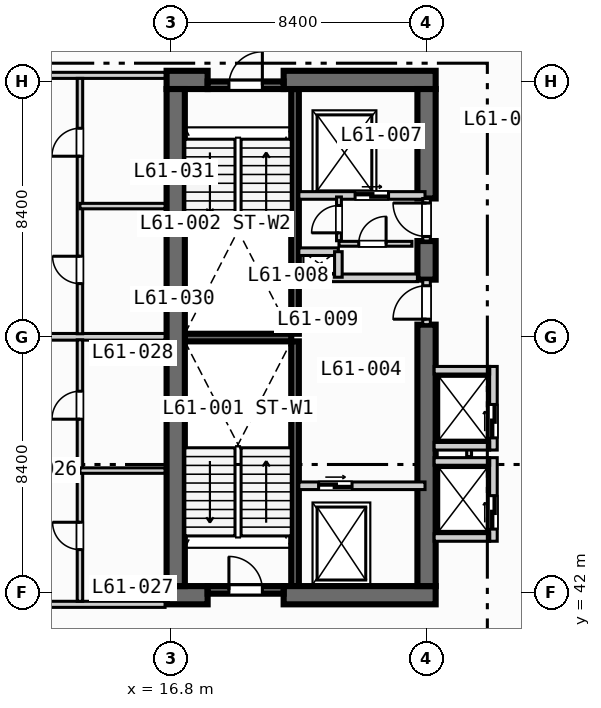
"""IFC4 building model, lengths in metres.
Left out: names, types, materials, properties, quantities, classifications, styles, units other than length and angle.
Written with IfcOpenShell. Run it as: python <this file> out.ifc"""

import sys

from ifc_helpers import new_model, si_unit, direction, frame, frame_2d, origin, place, context, subcontext, project, spatial, rectangle, extrude, element, fill, save


model = new_model("IFC4")
c1 = context("Model", 3, precision=1e-05, world=origin(), true_north=direction((0.0, 1.0)))
c2 = subcontext(c1, "Body", "Model", "MODEL_VIEW")
j1 = project(units=[si_unit("LENGTHUNIT", "METRE"), si_unit("PLANEANGLEUNIT", "RADIAN")], contexts=[c1])
p1 = place(None, origin())
s1 = spatial("IfcSite", under=j1, at=p1, CompositionType="ELEMENT")
p2 = place(p1, origin())
s2 = spatial("IfcBuilding", under=s1, at=p2, CompositionType="ELEMENT")
p3 = place(p2, frame((0.0, 0.0, 249.0)))
s3 = spatial("IfcBuildingStorey", under=s2, at=p3, CompositionType="ELEMENT", Elevation=249.0)
for number, where, z_axis, x_axis in (
    (1, (20.875, 42.2, 0.0), (0.0, 0.0, 1.0), (0.0, 1.0, 0.0)),
    (2, (20.875, 50.5, 0.0), (0.0, 0.0, 1.0), (0.0, 1.0, 0.0)),
):
    element("IfcWall", number, at=place(p3, frame(where, z_axis=z_axis, x_axis=x_axis)), inside=s3, PredefinedType="SOLIDWALL", context=c2, shape_type="SweptSolid", body=[
        extrude(rectangle(XDim=8.05, YDim=0.25, at=frame_2d((4.025, 0.0))), origin(), (0.0, 0.0, 1.0), 3.47),
    ])
p4 = place(p3, frame((17.25, 50.375, 0.0), z_axis=(0.0, 0.0, 1.0), x_axis=(1.0, 0.0, 0.0)))
e3 = element("IfcWall", 3, at=p4, inside=s3, PredefinedType="SOLIDWALL", context=c2, shape_type="SweptSolid", body=[
    extrude(rectangle(XDim=3.5, YDim=0.25, at=frame_2d((1.75, 0.0))), origin(), (0.0, 0.0, 1.0), 3.47),
])
p5 = place(p3, frame((16.65, 41.9, 0.0), z_axis=(0.0, 0.0, 1.0), x_axis=(1.0, 0.0, 0.0)))
e4 = element("IfcWall", 4, at=p5, inside=s3, PredefinedType="SHEAR", context=c2, shape_type="SweptSolid", body=[
    extrude(rectangle(XDim=1.35, YDim=0.6, at=frame_2d((0.675, 0.0))), origin(), (0.0, 0.0, 1.0), 3.47),
])
p6 = place(p3, frame((20.5, 41.9, 0.0), z_axis=(0.0, 0.0, 1.0), x_axis=(1.0, 0.0, 0.0)))
e5 = element("IfcWall", 5, at=p6, inside=s3, PredefinedType="SHEAR", context=c2, shape_type="SweptSolid", body=[
    extrude(rectangle(XDim=5.0, YDim=0.6, at=frame_2d((2.5, 0.0))), origin(), (0.0, 0.0, 1.0), 3.47),
])
p7 = place(p3, frame((16.65, 58.85, 0.0), z_axis=(0.0, 0.0, 1.0), x_axis=(1.0, 0.0, 0.0)))
e6 = element("IfcWall", 6, at=p7, inside=s3, PredefinedType="SHEAR", context=c2, shape_type="SweptSolid", body=[
    extrude(rectangle(XDim=1.35, YDim=0.6, at=frame_2d((0.675, 0.0))), origin(), (0.0, 0.0, 1.0), 3.47),
])
p8 = place(p3, frame((20.5, 58.85, 0.0), z_axis=(0.0, 0.0, 1.0), x_axis=(1.0, 0.0, 0.0)))
e7 = element("IfcWall", 7, at=p8, inside=s3, PredefinedType="SHEAR", context=c2, shape_type="SweptSolid", body=[
    extrude(rectangle(XDim=5.0, YDim=0.6, at=frame_2d((2.5, 0.0))), origin(), (0.0, 0.0, 1.0), 3.47),
])
p9 = place(p3, frame((16.95, 42.2, 0.0), z_axis=(0.0, 0.0, 1.0), x_axis=(0.0, 1.0, 0.0)))
e8 = element("IfcWall", 8, at=p9, inside=s3, PredefinedType="SHEAR", context=c2, shape_type="SweptSolid", body=[
    extrude(rectangle(XDim=16.35, YDim=0.6, at=frame_2d((8.175, 0.0))), origin(), (0.0, 0.0, 1.0), 3.47),
])
p10 = place(p3, frame((25.2, 42.2, 0.0), z_axis=(0.0, 0.0, 1.0), x_axis=(0.0, 1.0, 0.0)))
e9 = element("IfcWall", 9, at=p10, inside=s3, PredefinedType="SHEAR", context=c2, shape_type="SweptSolid", body=[
    extrude(rectangle(XDim=8.6, YDim=0.6, at=frame_2d((4.3, 0.0))), origin(), (0.0, 0.0, 1.0), 3.47),
])
p11 = place(p3, frame((25.2, 52.28, 0.0), z_axis=(0.0, 0.0, 1.0), x_axis=(0.0, 1.0, 0.0)))
e10 = element("IfcWall", 10, at=p11, inside=s3, PredefinedType="SHEAR", context=c2, shape_type="SweptSolid", body=[
    extrude(rectangle(XDim=1.27, YDim=0.6, at=frame_2d((0.635, 0.0))), origin(), (0.0, 0.0, 1.0), 3.47),
])
p12 = place(p3, frame((25.2, 54.95, 0.0), z_axis=(0.0, 0.0, 1.0), x_axis=(0.0, 1.0, 0.0)))
e11 = element("IfcWall", 11, at=p12, inside=s3, PredefinedType="SHEAR", context=c2, shape_type="SweptSolid", body=[
    extrude(rectangle(XDim=3.6, YDim=0.6, at=frame_2d((1.8, 0.0))), origin(), (0.0, 0.0, 1.0), 3.47),
])
p13 = place(p3, frame((18.0, 42.075, 0.0), z_axis=(0.0, 0.0, 1.0), x_axis=(1.0, 0.0, 0.0)))
e12 = element("IfcWall", 12, at=p13, inside=s3, PredefinedType="SOLIDWALL", context=c2, shape_type="SweptSolid", body=[
    extrude(rectangle(XDim=2.5, YDim=0.25, at=frame_2d((1.25, 0.0))), origin(), (0.0, 0.0, 1.0), 3.47),
])
p14 = place(p13, frame((0.7, 0.0, 0.0)))
e13 = element("IfcOpeningElement", 13, at=p14, cuts=e12, PredefinedType="OPENING", context=c2, shape_type="SweptSolid", body=[
    extrude(rectangle(XDim=1.1, YDim=2.15, at=frame_2d((0.55, 1.075))), frame((0.0, 0.135, 0.0), z_axis=(0.0, -1.0, 0.0), x_axis=(1.0, 0.0, 0.0)), (0.0, 0.0, 1.0), 0.27),
])
p15 = place(p3, frame((18.0, 58.675, 0.0), z_axis=(0.0, 0.0, 1.0), x_axis=(1.0, 0.0, 0.0)))
e14 = element("IfcWall", 14, at=p15, inside=s3, PredefinedType="SOLIDWALL", context=c2, shape_type="SweptSolid", body=[
    extrude(rectangle(XDim=2.5, YDim=0.25, at=frame_2d((1.25, 0.0))), origin(), (0.0, 0.0, 1.0), 3.47),
])
p16 = place(p15, frame((0.7, 0.0, 0.0)))
e15 = element("IfcOpeningElement", 15, at=p16, cuts=e14, PredefinedType="OPENING", context=c2, shape_type="SweptSolid", body=[
    extrude(rectangle(XDim=1.1, YDim=2.15, at=frame_2d((0.55, 1.075))), frame((0.0, 0.135, 0.0), z_axis=(0.0, -1.0, 0.0), x_axis=(1.0, 0.0, 0.0)), (0.0, 0.0, 1.0), 0.27),
])
p17 = place(p3, frame((21.0, 45.5, 0.0), z_axis=(0.0, 0.0, 1.0), x_axis=(1.0, 0.0, 0.0)))
e16 = element("IfcWall", 16, at=p17, inside=s3, PredefinedType="SOLIDWALL", context=c2, shape_type="SweptSolid", body=[
    extrude(rectangle(XDim=4.15, YDim=0.25, at=frame_2d((2.075, 0.0))), origin(), (0.0, 0.0, 1.0), 3.47),
])
p18 = place(p17, frame((0.65, 0.0, 0.0)))
e17 = element("IfcOpeningElement", 17, at=p18, cuts=e16, PredefinedType="OPENING", context=c2, shape_type="SweptSolid", body=[
    extrude(rectangle(XDim=1.1, YDim=2.15, at=frame_2d((0.55, 1.075))), frame((0.0, 0.135, 0.0), z_axis=(0.0, -1.0, 0.0), x_axis=(1.0, 0.0, 0.0)), (0.0, 0.0, 1.0), 0.27),
])
p19 = place(p3, frame((25.2, 50.8, 0.0), z_axis=(0.0, 0.0, 1.0), x_axis=(0.0, 1.0, 0.0)))
e18 = element("IfcWall", 18, at=p19, inside=s3, PredefinedType="SOLIDWALL", context=c2, shape_type="SweptSolid", body=[
    extrude(rectangle(XDim=1.48, YDim=0.25, at=frame_2d((0.74, 0.0))), origin(), (0.0, 0.0, 1.0), 3.47),
])
p20 = place(p19, frame((0.18, 0.0, 0.0)))
e19 = element("IfcOpeningElement", 19, at=p20, cuts=e18, PredefinedType="OPENING", context=c2, shape_type="SweptSolid", body=[
    extrude(rectangle(XDim=1.1, YDim=2.15, at=frame_2d((0.55, 1.075))), frame((0.0, 0.135, 0.0), z_axis=(0.0, -1.0, 0.0), x_axis=(1.0, 0.0, 0.0)), (0.0, 0.0, 1.0), 0.27),
])
p21 = place(p3, frame((21.0, 52.34, 0.0), z_axis=(0.0, 0.0, 1.0), x_axis=(1.0, 0.0, 0.0)))
e20 = element("IfcWall", 20, at=p21, inside=s3, PredefinedType="SOLIDWALL", context=c2, shape_type="SweptSolid", body=[
    extrude(rectangle(XDim=3.9, YDim=0.25, at=frame_2d((1.95, 0.0))), origin(), (0.0, 0.0, 1.0), 3.47),
])
p22 = place(p3, frame((21.0, 55.05, 0.0), z_axis=(0.0, 0.0, 1.0), x_axis=(1.0, 0.0, 0.0)))
e21 = element("IfcWall", 21, at=p22, inside=s3, PredefinedType="SOLIDWALL", context=c2, shape_type="SweptSolid", body=[
    extrude(rectangle(XDim=4.15, YDim=0.25, at=frame_2d((2.075, 0.0))), origin(), (0.0, 0.0, 1.0), 3.47),
])
p23 = place(p22, frame((1.85, 0.0, 0.0)))
e22 = element("IfcOpeningElement", 22, at=p23, cuts=e21, PredefinedType="OPENING", context=c2, shape_type="SweptSolid", body=[
    extrude(rectangle(XDim=1.1, YDim=2.15, at=frame_2d((0.55, 1.075))), frame((0.0, 0.135, 0.0), z_axis=(0.0, -1.0, 0.0), x_axis=(1.0, 0.0, 0.0)), (0.0, 0.0, 1.0), 0.27),
])
p24 = place(p3, frame((25.2, 53.55, 0.0), z_axis=(0.0, 0.0, 1.0), x_axis=(0.0, 1.0, 0.0)))
e23 = element("IfcWall", 23, at=p24, inside=s3, PredefinedType="SOLIDWALL", context=c2, shape_type="SweptSolid", body=[
    extrude(rectangle(XDim=1.4, YDim=0.25, at=frame_2d((0.7, 0.0))), origin(), (0.0, 0.0, 1.0), 3.47),
])
p25 = place(p24, frame((0.15, 0.0, 0.0)))
e24 = element("IfcOpeningElement", 24, at=p25, cuts=e23, PredefinedType="OPENING", context=c2, shape_type="SweptSolid", body=[
    extrude(rectangle(XDim=1.1, YDim=2.15, at=frame_2d((0.55, 1.075))), frame((0.0, 0.135, 0.0), z_axis=(0.0, -1.0, 0.0), x_axis=(1.0, 0.0, 0.0)), (0.0, 0.0, 1.0), 0.27),
])
p26 = place(p3, frame((21.0, 53.2, 0.0), z_axis=(0.0, 0.0, 1.0), x_axis=(1.0, 0.0, 0.0)))
e25 = element("IfcWall", 25, at=p26, inside=s3, PredefinedType="SOLIDWALL", context=c2, shape_type="SweptSolid", body=[
    extrude(rectangle(XDim=1.3, YDim=0.25, at=frame_2d((0.65, 0.0))), origin(), (0.0, 0.0, 1.0), 3.47),
])
p27 = place(p3, frame((22.3, 52.36, 0.0), z_axis=(0.0, 0.0, 1.0), x_axis=(0.0, 1.0, 0.0)))
e26 = element("IfcWall", 26, at=p27, inside=s3, PredefinedType="SOLIDWALL", context=c2, shape_type="SweptSolid", body=[
    extrude(rectangle(XDim=0.84, YDim=0.25, at=frame_2d((0.42, 0.0))), origin(), (0.0, 0.0, 1.0), 3.47),
])
p28 = place(p3, frame((22.32, 53.56, 0.0), z_axis=(0.0, 0.0, 1.0), x_axis=(0.0, 1.0, 0.0)))
e27 = element("IfcWall", 27, at=p28, inside=s3, PredefinedType="PARTITIONING", context=c2, shape_type="SweptSolid", body=[
    extrude(rectangle(XDim=1.44, YDim=0.16, at=frame_2d((0.72, 0.0))), origin(), (0.0, 0.0, 1.0), 3.47),
])
p29 = place(p28, frame((0.26, 0.0, 0.0)))
e28 = element("IfcOpeningElement", 28, at=p29, cuts=e27, PredefinedType="OPENING", context=c2, shape_type="SweptSolid", body=[
    extrude(rectangle(XDim=0.9, YDim=2.1, at=frame_2d((0.45, 1.05))), frame((0.0, 0.09, 0.0), z_axis=(0.0, -1.0, 0.0), x_axis=(1.0, 0.0, 0.0)), (0.0, 0.0, 1.0), 0.18),
])
p30 = place(p3, frame((22.32, 53.46, 0.0), z_axis=(0.0, 0.0, 1.0), x_axis=(1.0, 0.0, 0.0)))
e29 = element("IfcWall", 29, at=p30, inside=s3, PredefinedType="PARTITIONING", context=c2, shape_type="SweptSolid", body=[
    extrude(rectangle(XDim=2.4, YDim=0.16, at=frame_2d((1.2, 0.0))), origin(), (0.0, 0.0, 1.0), 3.47),
])
p31 = place(p30, frame((0.65, 0.0, 0.0)))
e30 = element("IfcOpeningElement", 30, at=p31, cuts=e29, PredefinedType="OPENING", context=c2, shape_type="SweptSolid", body=[
    extrude(rectangle(XDim=0.9, YDim=2.1, at=frame_2d((0.45, 1.05))), frame((0.0, 0.09, 0.0), z_axis=(0.0, -1.0, 0.0), x_axis=(1.0, 0.0, 0.0)), (0.0, 0.0, 1.0), 0.18),
])
p32 = place(p3, frame((27.4, 43.675, 0.0), z_axis=(0.0, 0.0, 1.0), x_axis=(0.0, 1.0, 0.0)))
e31 = element("IfcWall", 31, at=p32, inside=s3, PredefinedType="SOLIDWALL", context=c2, shape_type="SweptSolid", body=[
    extrude(rectangle(XDim=2.75, YDim=0.25, at=frame_2d((1.375, 0.0))), origin(), (0.0, 0.0, 1.0), 3.47),
])
p33 = place(p32, frame((0.4, 0.0, 0.0)))
e32 = element("IfcOpeningElement", 32, at=p33, cuts=e31, PredefinedType="OPENING", context=c2, shape_type="SweptSolid", body=[
    extrude(rectangle(XDim=1.1, YDim=2.15, at=frame_2d((0.55, 1.075))), frame((0.0, 0.135, 0.0), z_axis=(0.0, -1.0, 0.0), x_axis=(1.0, 0.0, 0.0)), (0.0, 0.0, 1.0), 0.27),
])
for number, where, z_axis, x_axis in (
    (33, (25.45, 43.8, 0.0), (0.0, 0.0, 1.0), (1.0, 0.0, 0.0)),
    (34, (25.45, 46.3, 0.0), (0.0, 0.0, 1.0), (1.0, 0.0, 0.0)),
):
    element("IfcWall", number, at=place(p3, frame(where, z_axis=z_axis, x_axis=x_axis)), inside=s3, PredefinedType="SOLIDWALL", context=c2, shape_type="SweptSolid", body=[
        extrude(rectangle(XDim=1.825, YDim=0.25, at=frame_2d((0.913, 0.0))), origin(), (0.0, 0.0, 1.0), 3.47),
    ])
p34 = place(p3, frame((26.6, 46.46, 0.0), z_axis=(0.0, 0.0, 1.0), x_axis=(0.0, 1.0, 0.0)))
e35 = element("IfcWall", 35, at=p34, inside=s3, PredefinedType="PARTITIONING", context=c2, shape_type="SweptSolid", body=[
    extrude(rectangle(XDim=0.88, YDim=0.16, at=frame_2d((0.44, 0.0))), origin(), (0.0, 0.0, 1.0), 3.47),
])
p35 = place(p3, frame((27.4, 46.675, 0.0), z_axis=(0.0, 0.0, 1.0), x_axis=(0.0, 1.0, 0.0)))
e36 = element("IfcWall", 36, at=p35, inside=s3, PredefinedType="SOLIDWALL", context=c2, shape_type="SweptSolid", body=[
    extrude(rectangle(XDim=2.75, YDim=0.25, at=frame_2d((1.375, 0.0))), origin(), (0.0, 0.0, 1.0), 3.47),
])
p36 = place(p35, frame((0.4, 0.0, 0.0)))
e37 = element("IfcOpeningElement", 37, at=p36, cuts=e36, PredefinedType="OPENING", context=c2, shape_type="SweptSolid", body=[
    extrude(rectangle(XDim=1.1, YDim=2.15, at=frame_2d((0.55, 1.075))), frame((0.0, 0.135, 0.0), z_axis=(0.0, -1.0, 0.0), x_axis=(1.0, 0.0, 0.0)), (0.0, 0.0, 1.0), 0.27),
])
for number, where, z_axis, x_axis in (
    (38, (25.45, 46.8, 0.0), (0.0, 0.0, 1.0), (1.0, 0.0, 0.0)),
    (39, (25.45, 49.3, 0.0), (0.0, 0.0, 1.0), (1.0, 0.0, 0.0)),
):
    element("IfcWall", number, at=place(p3, frame(where, z_axis=z_axis, x_axis=x_axis)), inside=s3, PredefinedType="SOLIDWALL", context=c2, shape_type="SweptSolid", body=[
        extrude(rectangle(XDim=1.825, YDim=0.25, at=frame_2d((0.913, 0.0))), origin(), (0.0, 0.0, 1.0), 3.47),
    ])
p37 = place(p3, frame((8.65, 41.6, 0.0), z_axis=(0.0, 0.0, 1.0), x_axis=(1.0, 0.0, 0.0)))
e40 = element("IfcWall", 40, at=p37, inside=s3, PredefinedType="PARTITIONING", context=c2, shape_type="SweptSolid", body=[
    extrude(rectangle(XDim=7.95, YDim=0.2, at=frame_2d((3.975, 0.0))), origin(), (0.0, 0.0, 1.0), 3.47),
])
p38 = place(p37, frame((2.0, 0.0, 0.0)))
e41 = element("IfcOpeningElement", 41, at=p38, cuts=e40, PredefinedType="OPENING", context=c2, shape_type="SweptSolid", body=[
    extrude(rectangle(XDim=1.0, YDim=2.15, at=frame_2d((0.5, 1.075))), frame((0.0, 0.11, 0.0), z_axis=(0.0, -1.0, 0.0), x_axis=(1.0, 0.0, 0.0)), (0.0, 0.0, 1.0), 0.22),
])
p39 = place(p3, frame((8.65, 59.0, 0.0), z_axis=(0.0, 0.0, 1.0), x_axis=(1.0, 0.0, 0.0)))
e42 = element("IfcWall", 42, at=p39, inside=s3, PredefinedType="PARTITIONING", context=c2, shape_type="SweptSolid", body=[
    extrude(rectangle(XDim=7.95, YDim=0.2, at=frame_2d((3.975, 0.0))), origin(), (0.0, 0.0, 1.0), 2.853),
])
p40 = place(p39, frame((2.0, 0.0, 0.0)))
e43 = element("IfcOpeningElement", 43, at=p40, cuts=e42, PredefinedType="OPENING", context=c2, shape_type="SweptSolid", body=[
    extrude(rectangle(XDim=1.0, YDim=2.15, at=frame_2d((0.5, 1.075))), frame((0.0, 0.11, 0.0), z_axis=(0.0, -1.0, 0.0), x_axis=(1.0, 0.0, 0.0)), (0.0, 0.0, 1.0), 0.22),
])
p41 = place(p3, frame((8.65, 50.4, 0.0), z_axis=(0.0, 0.0, 1.0), x_axis=(1.0, 0.0, 0.0)))
e44 = element("IfcWall", 44, at=p41, inside=s3, PredefinedType="PARTITIONING", context=c2, shape_type="SweptSolid", body=[
    extrude(rectangle(XDim=7.95, YDim=0.22, at=frame_2d((3.975, 0.0))), origin(), (0.0, 0.0, 1.0), 2.82),
])
p42 = place(p3, frame((13.8, 41.7, 0.0), z_axis=(0.0, 0.0, 1.0), x_axis=(0.0, 1.0, 0.0)))
e45 = element("IfcWall", 45, at=p42, inside=s3, PredefinedType="PLUMBINGWALL", context=c2, shape_type="SweptSolid", body=[
    extrude(rectangle(XDim=8.6, YDim=0.18, at=frame_2d((4.3, 0.0))), origin(), (0.0, 0.0, 1.0), 3.47),
])
p43 = place(p42, frame((1.7, 0.0, 0.0)))
e46 = element("IfcOpeningElement", 46, at=p43, cuts=e45, PredefinedType="OPENING", context=c2, shape_type="SweptSolid", body=[
    extrude(rectangle(XDim=0.9, YDim=2.1, at=frame_2d((0.45, 1.05))), frame((0.0, 0.1, 0.0), z_axis=(0.0, -1.0, 0.0), x_axis=(1.0, 0.0, 0.0)), (0.0, 0.0, 1.0), 0.2),
])
p44 = place(p42, frame((5.99, 0.0, 0.0)))
e47 = element("IfcOpeningElement", 47, at=p44, cuts=e45, PredefinedType="OPENING", context=c2, shape_type="SweptSolid", body=[
    extrude(rectangle(XDim=0.92, YDim=2.1, at=frame_2d((0.46, 1.05))), frame((0.0, 0.1, 0.0), z_axis=(0.0, -1.0, 0.0), x_axis=(1.0, 0.0, 0.0)), (0.0, 0.0, 1.0), 0.2),
])
p45 = place(p3, frame((13.8, 46.0, 0.0), z_axis=(0.0, 0.0, 1.0), x_axis=(1.0, 0.0, 0.0)))
e48 = element("IfcWall", 48, at=p45, inside=s3, PredefinedType="PLUMBINGWALL", context=c2, shape_type="SweptSolid", body=[
    extrude(rectangle(XDim=2.8, YDim=0.18, at=frame_2d((1.4, 0.0))), origin(), (0.0, 0.0, 1.0), 3.47),
])
p46 = place(p3, frame((13.8, 50.5, 0.0), z_axis=(0.0, 0.0, 1.0), x_axis=(0.0, 1.0, 0.0)))
e49 = element("IfcWall", 49, at=p46, inside=s3, PredefinedType="PLUMBINGWALL", context=c2, shape_type="SweptSolid", body=[
    extrude(rectangle(XDim=8.4, YDim=0.18, at=frame_2d((4.2, 0.0))), origin(), (0.0, 0.0, 1.0), 3.47),
])
p47 = place(p46, frame((1.65, 0.0, 0.0)))
e50 = element("IfcOpeningElement", 50, at=p47, cuts=e49, PredefinedType="OPENING", context=c2, shape_type="SweptSolid", body=[
    extrude(rectangle(XDim=0.9, YDim=2.1, at=frame_2d((0.45, 1.05))), frame((0.0, 0.1, 0.0), z_axis=(0.0, -1.0, 0.0), x_axis=(1.0, 0.0, 0.0)), (0.0, 0.0, 1.0), 0.2),
])
p48 = place(p46, frame((5.84, 0.0, 0.0)))
e51 = element("IfcOpeningElement", 51, at=p48, cuts=e49, PredefinedType="OPENING", context=c2, shape_type="SweptSolid", body=[
    extrude(rectangle(XDim=0.92, YDim=2.1, at=frame_2d((0.46, 1.05))), frame((0.0, 0.1, 0.0), z_axis=(0.0, -1.0, 0.0), x_axis=(1.0, 0.0, 0.0)), (0.0, 0.0, 1.0), 0.2),
])
p49 = place(p3, frame((13.8, 54.7, 0.0), z_axis=(0.0, 0.0, 1.0), x_axis=(1.0, 0.0, 0.0)))
e52 = element("IfcWall", 52, at=p49, inside=s3, PredefinedType="PLUMBINGWALL", context=c2, shape_type="SweptSolid", body=[
    extrude(rectangle(XDim=2.8, YDim=0.18, at=frame_2d((1.4, 0.0))), origin(), (0.0, 0.0, 1.0), 3.47),
])
p50 = place(p14, origin())
e53 = element("IfcDoor", 53, at=p50, inside=s3, OperationType="SINGLE_SWING_LEFT", PredefinedType="DOOR", context=c2, shape_type="SweptSolid", body=[
    extrude(rectangle(XDim=1.1, YDim=2.15, at=frame_2d((0.55, 1.075))), frame((0.0, 0.025, 0.0), z_axis=(0.0, -1.0, 0.0), x_axis=(1.0, 0.0, 0.0)), (0.0, 0.0, 1.0), 0.05),
])
fill(e13, e53)
p51 = place(p16, origin())
e54 = element("IfcDoor", 54, at=p51, inside=s3, OperationType="SINGLE_SWING_RIGHT", PredefinedType="DOOR", context=c2, shape_type="SweptSolid", body=[
    extrude(rectangle(XDim=1.1, YDim=2.15, at=frame_2d((0.55, 1.075))), frame((0.0, 0.025, 0.0), z_axis=(0.0, -1.0, 0.0), x_axis=(1.0, 0.0, 0.0)), (0.0, 0.0, 1.0), 0.05),
])
fill(e15, e54)
p52 = place(p18, origin())
e55 = element("IfcDoor", 55, at=p52, inside=s3, OperationType="SLIDING_TO_LEFT", PredefinedType="DOOR", context=c2, shape_type="SweptSolid", body=[
    extrude(rectangle(XDim=1.1, YDim=2.15, at=frame_2d((0.55, 1.075))), frame((0.0, 0.025, 0.0), z_axis=(0.0, -1.0, 0.0), x_axis=(1.0, 0.0, 0.0)), (0.0, 0.0, 1.0), 0.05),
])
fill(e17, e55)
p53 = place(p20, origin())
e56 = element("IfcDoor", 56, at=p53, inside=s3, OperationType="SINGLE_SWING_LEFT", PredefinedType="DOOR", context=c2, shape_type="SweptSolid", body=[
    extrude(rectangle(XDim=1.1, YDim=2.15, at=frame_2d((0.55, 1.075))), frame((0.0, 0.025, 0.0), z_axis=(0.0, -1.0, 0.0), x_axis=(1.0, 0.0, 0.0)), (0.0, 0.0, 1.0), 0.05),
])
fill(e19, e56)
p54 = place(p23, origin())
e57 = element("IfcDoor", 57, at=p54, inside=s3, OperationType="SLIDING_TO_LEFT", PredefinedType="DOOR", context=c2, shape_type="SweptSolid", body=[
    extrude(rectangle(XDim=1.1, YDim=2.15, at=frame_2d((0.55, 1.075))), frame((0.0, 0.025, 0.0), z_axis=(0.0, -1.0, 0.0), x_axis=(1.0, 0.0, 0.0)), (0.0, 0.0, 1.0), 0.05),
])
fill(e22, e57)
p55 = place(p25, origin())
e58 = element("IfcDoor", 58, at=p55, inside=s3, OperationType="SINGLE_SWING_RIGHT", PredefinedType="DOOR", context=c2, shape_type="SweptSolid", body=[
    extrude(rectangle(XDim=1.1, YDim=2.15, at=frame_2d((0.55, 1.075))), frame((0.0, 0.025, 0.0), z_axis=(0.0, -1.0, 0.0), x_axis=(1.0, 0.0, 0.0)), (0.0, 0.0, 1.0), 0.05),
])
fill(e24, e58)
p56 = place(p29, origin())
e59 = element("IfcDoor", 59, at=p56, inside=s3, OperationType="SINGLE_SWING_LEFT", PredefinedType="DOOR", context=c2, shape_type="SweptSolid", body=[
    extrude(rectangle(XDim=0.9, YDim=2.1, at=frame_2d((0.45, 1.05))), frame((0.0, 0.025, 0.0), z_axis=(0.0, -1.0, 0.0), x_axis=(1.0, 0.0, 0.0)), (0.0, 0.0, 1.0), 0.05),
])
fill(e28, e59)
p57 = place(p31, origin())
e60 = element("IfcDoor", 60, at=p57, inside=s3, OperationType="SINGLE_SWING_RIGHT", PredefinedType="DOOR", context=c2, shape_type="SweptSolid", body=[
    extrude(rectangle(XDim=0.9, YDim=2.1, at=frame_2d((0.45, 1.05))), frame((0.0, 0.025, 0.0), z_axis=(0.0, -1.0, 0.0), x_axis=(1.0, 0.0, 0.0)), (0.0, 0.0, 1.0), 0.05),
])
fill(e30, e60)
p58 = place(p33, origin())
e61 = element("IfcDoor", 61, at=p58, inside=s3, OperationType="SLIDING_TO_LEFT", PredefinedType="DOOR", context=c2, shape_type="SweptSolid", body=[
    extrude(rectangle(XDim=1.1, YDim=2.15, at=frame_2d((0.55, 1.075))), frame((0.0, 0.025, 0.0), z_axis=(0.0, -1.0, 0.0), x_axis=(1.0, 0.0, 0.0)), (0.0, 0.0, 1.0), 0.05),
])
fill(e32, e61)
p59 = place(p36, origin())
e62 = element("IfcDoor", 62, at=p59, inside=s3, OperationType="SLIDING_TO_LEFT", PredefinedType="DOOR", context=c2, shape_type="SweptSolid", body=[
    extrude(rectangle(XDim=1.1, YDim=2.15, at=frame_2d((0.55, 1.075))), frame((0.0, 0.025, 0.0), z_axis=(0.0, -1.0, 0.0), x_axis=(1.0, 0.0, 0.0)), (0.0, 0.0, 1.0), 0.05),
])
fill(e37, e62)
p60 = place(p43, origin())
e63 = element("IfcDoor", 63, at=p60, inside=s3, OperationType="SINGLE_SWING_RIGHT", PredefinedType="DOOR", context=c2, shape_type="SweptSolid", body=[
    extrude(rectangle(XDim=0.9, YDim=2.1, at=frame_2d((0.45, 1.05))), frame((0.0, 0.025, 0.0), z_axis=(0.0, -1.0, 0.0), x_axis=(1.0, 0.0, 0.0)), (0.0, 0.0, 1.0), 0.05),
])
fill(e46, e63)
p61 = place(p44, origin())
e64 = element("IfcDoor", 64, at=p61, inside=s3, OperationType="SINGLE_SWING_LEFT", PredefinedType="DOOR", context=c2, shape_type="SweptSolid", body=[
    extrude(rectangle(XDim=0.92, YDim=2.1, at=frame_2d((0.46, 1.05))), frame((0.0, 0.025, 0.0), z_axis=(0.0, -1.0, 0.0), x_axis=(1.0, 0.0, 0.0)), (0.0, 0.0, 1.0), 0.05),
])
fill(e47, e64)
p62 = place(p47, origin())
e65 = element("IfcDoor", 65, at=p62, inside=s3, OperationType="SINGLE_SWING_RIGHT", PredefinedType="DOOR", context=c2, shape_type="SweptSolid", body=[
    extrude(rectangle(XDim=0.9, YDim=2.1, at=frame_2d((0.45, 1.05))), frame((0.0, 0.025, 0.0), z_axis=(0.0, -1.0, 0.0), x_axis=(1.0, 0.0, 0.0)), (0.0, 0.0, 1.0), 0.05),
])
fill(e50, e65)
p63 = place(p48, origin())
e66 = element("IfcDoor", 66, at=p63, inside=s3, OperationType="SINGLE_SWING_LEFT", PredefinedType="DOOR", context=c2, shape_type="SweptSolid", body=[
    extrude(rectangle(XDim=0.92, YDim=2.1, at=frame_2d((0.46, 1.05))), frame((0.0, 0.025, 0.0), z_axis=(0.0, -1.0, 0.0), x_axis=(1.0, 0.0, 0.0)), (0.0, 0.0, 1.0), 0.05),
])
fill(e51, e66)
save(model, sys.argv[1])
